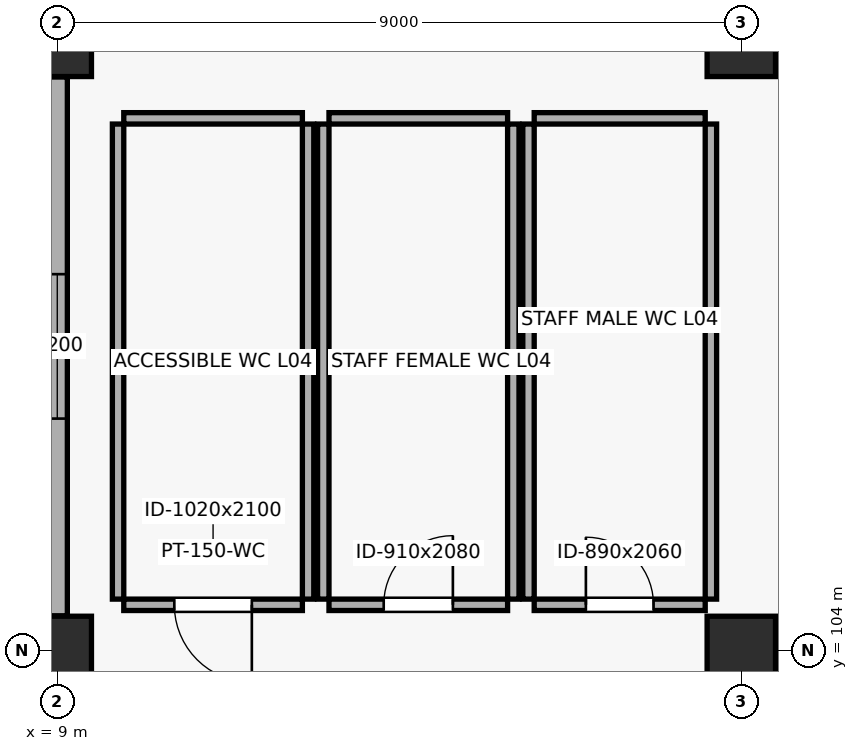
"""IFC4 building model, lengths in metres.
Left out: names, types, materials, properties, quantities, classifications, styles, units other than length and angle.
Written with IfcOpenShell. Run it as: python <this file> out.ifc"""

import sys

from ifc_helpers import new_model, si_unit, direction, frame, frame_2d, origin, origin_2d, place, context, subcontext, project, spatial, rectangle, extrude, element, fill, save


model = new_model("IFC4")
c1 = context("Model", 3, precision=1e-05, world=origin(), true_north=direction((0.0, 1.0)))
c2 = subcontext(c1, "Body", "Model", "MODEL_VIEW")
j1 = project(units=[si_unit("LENGTHUNIT", "METRE"), si_unit("PLANEANGLEUNIT", "RADIAN")], contexts=[c1])
p1 = place(None, origin())
s1 = spatial("IfcSite", under=j1, at=p1, CompositionType="ELEMENT")
p2 = place(p1, origin())
s2 = spatial("IfcBuilding", under=s1, at=p2, CompositionType="ELEMENT")
p3 = place(p2, frame((0.0, 0.0, 18.0)))
s3 = spatial("IfcBuildingStorey", under=s2, at=p3, CompositionType="ELEMENT", Elevation=18.0)
for number, where, z_axis, x_axis in (
    (1, (9.0, 104.0, 0.0), (0.0, 0.0, 1.0), (1.0, 0.0, 0.0)),
    (2, (9.0, 112.0, 0.0), (0.0, 0.0, 1.0), (1.0, 0.0, 0.0)),
    (3, (18.0, 104.0, 0.0), (0.0, 0.0, 1.0), (1.0, 0.0, 0.0)),
    (4, (18.0, 112.0, 0.0), (0.0, 0.0, 1.0), (1.0, 0.0, 0.0)),
):
    element("IfcColumn", number, at=place(p3, frame(where, z_axis=z_axis, x_axis=x_axis)), inside=s3, PredefinedType="COLUMN", context=c2, shape_type="SweptSolid", body=[
        extrude(rectangle(XDim=0.9, YDim=0.9, at=origin_2d()), origin(), (0.0, 0.0, 1.0), 3.9),
    ])
p4 = place(p3, frame((9.0, 104.455, 0.0), z_axis=(0.0, 0.0, 1.0), x_axis=(0.0, 1.0, 0.0)))
e5 = element("IfcWall", 5, at=p4, inside=s3, PredefinedType="STANDARD", context=c2, shape_type="SweptSolid", body=[
    extrude(rectangle(XDim=7.09, YDim=0.265, at=frame_2d((3.545, 0.0))), origin(), (0.0, 0.0, 1.0), 2.98),
])
p5 = place(p4, frame((2.595, 0.0, 0.85)))
e6 = element("IfcOpeningElement", 6, at=p5, cuts=e5, PredefinedType="OPENING", context=c2, shape_type="SweptSolid", body=[
    extrude(rectangle(XDim=1.9, YDim=1.2, at=frame_2d((0.95, 0.6))), frame((0.0, 0.145, 0.0), z_axis=(0.0, -1.0, 0.0), x_axis=(1.0, 0.0, 0.0)), (0.0, 0.0, 1.0), 0.289),
])
p6 = place(p3, frame((9.875, 104.6, 0.0), z_axis=(0.0, 0.0, 1.0), x_axis=(1.0, 0.0, 0.0)))
e7 = element("IfcWall", 7, at=p6, inside=s3, PredefinedType="PARTITIONING", context=c2, shape_type="SweptSolid", body=[
    extrude(rectangle(XDim=2.35, YDim=0.15, at=frame_2d((1.175, 0.0))), origin(), (0.0, 0.0, 1.0), 3.65),
])
p7 = place(p6, frame((0.665, 0.0, 0.0)))
e8 = element("IfcOpeningElement", 8, at=p7, cuts=e7, PredefinedType="OPENING", context=c2, shape_type="SweptSolid", body=[
    extrude(rectangle(XDim=1.02, YDim=2.1, at=frame_2d((0.51, 1.05))), frame((0.0, 0.087, 0.0), z_axis=(0.0, -1.0, 0.0), x_axis=(1.0, 0.0, 0.0)), (0.0, 0.0, 1.0), 0.174),
])
p8 = place(p3, frame((9.875, 111.0, 0.0), z_axis=(0.0, 0.0, 1.0), x_axis=(1.0, 0.0, 0.0)))
e9 = element("IfcWall", 9, at=p8, inside=s3, PredefinedType="PARTITIONING", context=c2, shape_type="SweptSolid", body=[
    extrude(rectangle(XDim=2.35, YDim=0.15, at=frame_2d((1.175, 0.0))), origin(), (0.0, 0.0, 1.0), 3.65),
])
for number, where, z_axis, x_axis in (
    (10, (9.8, 104.675, 0.0), (0.0, 0.0, 1.0), (0.0, 1.0, 0.0)),
    (11, (12.3, 104.675, 0.0), (0.0, 0.0, 1.0), (0.0, 1.0, 0.0)),
):
    element("IfcWall", number, at=place(p3, frame(where, z_axis=z_axis, x_axis=x_axis)), inside=s3, PredefinedType="PARTITIONING", context=c2, shape_type="SweptSolid", body=[
        extrude(rectangle(XDim=6.25, YDim=0.15, at=frame_2d((3.125, 0.0))), origin(), (0.0, 0.0, 1.0), 3.65),
    ])
p9 = place(p3, frame((12.575, 104.6, 0.0), z_axis=(0.0, 0.0, 1.0), x_axis=(1.0, 0.0, 0.0)))
e12 = element("IfcWall", 12, at=p9, inside=s3, PredefinedType="PARTITIONING", context=c2, shape_type="SweptSolid", body=[
    extrude(rectangle(XDim=2.35, YDim=0.15, at=frame_2d((1.175, 0.0))), origin(), (0.0, 0.0, 1.0), 3.65),
])
p10 = place(p9, frame((0.72, 0.0, 0.0)))
e13 = element("IfcOpeningElement", 13, at=p10, cuts=e12, PredefinedType="OPENING", context=c2, shape_type="SweptSolid", body=[
    extrude(rectangle(XDim=0.91, YDim=2.08, at=frame_2d((0.455, 1.04))), frame((0.0, 0.087, 0.0), z_axis=(0.0, -1.0, 0.0), x_axis=(1.0, 0.0, 0.0)), (0.0, 0.0, 1.0), 0.174),
])
p11 = place(p3, frame((12.575, 111.0, 0.0), z_axis=(0.0, 0.0, 1.0), x_axis=(1.0, 0.0, 0.0)))
e14 = element("IfcWall", 14, at=p11, inside=s3, PredefinedType="PARTITIONING", context=c2, shape_type="SweptSolid", body=[
    extrude(rectangle(XDim=2.35, YDim=0.15, at=frame_2d((1.175, 0.0))), origin(), (0.0, 0.0, 1.0), 3.65),
])
for number, where, z_axis, x_axis in (
    (15, (12.5, 104.675, 0.0), (0.0, 0.0, 1.0), (0.0, 1.0, 0.0)),
    (16, (15.0, 104.675, 0.0), (0.0, 0.0, 1.0), (0.0, 1.0, 0.0)),
):
    element("IfcWall", number, at=place(p3, frame(where, z_axis=z_axis, x_axis=x_axis)), inside=s3, PredefinedType="PARTITIONING", context=c2, shape_type="SweptSolid", body=[
        extrude(rectangle(XDim=6.25, YDim=0.15, at=frame_2d((3.125, 0.0))), origin(), (0.0, 0.0, 1.0), 3.65),
    ])
p12 = place(p3, frame((15.275, 104.6, 0.0), z_axis=(0.0, 0.0, 1.0), x_axis=(1.0, 0.0, 0.0)))
e17 = element("IfcWall", 17, at=p12, inside=s3, PredefinedType="PARTITIONING", context=c2, shape_type="SweptSolid", body=[
    extrude(rectangle(XDim=2.25, YDim=0.15, at=frame_2d((1.125, 0.0))), origin(), (0.0, 0.0, 1.0), 3.65),
])
p13 = place(p12, frame((0.68, 0.0, 0.0)))
e18 = element("IfcOpeningElement", 18, at=p13, cuts=e17, PredefinedType="OPENING", context=c2, shape_type="SweptSolid", body=[
    extrude(rectangle(XDim=0.89, YDim=2.06, at=frame_2d((0.445, 1.03))), frame((0.0, 0.087, 0.0), z_axis=(0.0, -1.0, 0.0), x_axis=(1.0, 0.0, 0.0)), (0.0, 0.0, 1.0), 0.174),
])
p14 = place(p3, frame((15.275, 111.0, 0.0), z_axis=(0.0, 0.0, 1.0), x_axis=(1.0, 0.0, 0.0)))
e19 = element("IfcWall", 19, at=p14, inside=s3, PredefinedType="PARTITIONING", context=c2, shape_type="SweptSolid", body=[
    extrude(rectangle(XDim=2.25, YDim=0.15, at=frame_2d((1.125, 0.0))), origin(), (0.0, 0.0, 1.0), 3.65),
])
for number, where, z_axis, x_axis in (
    (20, (15.2, 104.675, 0.0), (0.0, 0.0, 1.0), (0.0, 1.0, 0.0)),
    (21, (17.6, 104.675, 0.0), (0.0, 0.0, 1.0), (0.0, 1.0, 0.0)),
):
    element("IfcWall", number, at=place(p3, frame(where, z_axis=z_axis, x_axis=x_axis)), inside=s3, PredefinedType="PARTITIONING", context=c2, shape_type="SweptSolid", body=[
        extrude(rectangle(XDim=6.25, YDim=0.15, at=frame_2d((3.125, 0.0))), origin(), (0.0, 0.0, 1.0), 3.65),
    ])
p15 = place(p5, origin())
e22 = element("IfcWindow", 22, at=p15, inside=s3, PartitioningType="SINGLE_PANEL", PredefinedType="WINDOW", context=c2, shape_type="SweptSolid", body=[
    extrude(rectangle(XDim=1.9, YDim=1.2, at=frame_2d((0.95, 0.6))), frame((0.0, 0.03, 0.0), z_axis=(0.0, -1.0, 0.0), x_axis=(1.0, 0.0, 0.0)), (0.0, 0.0, 1.0), 0.06),
])
fill(e6, e22)
p16 = place(p7, frame((1.02, 0.0, 0.0), z_axis=(0.0, 0.0, 1.0), x_axis=(-1.0, 0.0, 0.0)))
e23 = element("IfcDoor", 23, at=p16, inside=s3, OperationType="SINGLE_SWING_LEFT", PredefinedType="DOOR", context=c2, shape_type="SweptSolid", body=[
    extrude(rectangle(XDim=1.02, YDim=2.1, at=frame_2d((0.51, 1.05))), frame((0.0, 0.025, 0.0), z_axis=(0.0, -1.0, 0.0), x_axis=(1.0, 0.0, 0.0)), (0.0, 0.0, 1.0), 0.05),
])
fill(e8, e23)
p17 = place(p10, origin())
e24 = element("IfcDoor", 24, at=p17, inside=s3, OperationType="SINGLE_SWING_RIGHT", PredefinedType="DOOR", context=c2, shape_type="SweptSolid", body=[
    extrude(rectangle(XDim=0.91, YDim=2.08, at=frame_2d((0.455, 1.04))), frame((0.0, 0.025, 0.0), z_axis=(0.0, -1.0, 0.0), x_axis=(1.0, 0.0, 0.0)), (0.0, 0.0, 1.0), 0.05),
])
fill(e13, e24)
p18 = place(p13, origin())
e25 = element("IfcDoor", 25, at=p18, inside=s3, OperationType="SINGLE_SWING_LEFT", PredefinedType="DOOR", context=c2, shape_type="SweptSolid", body=[
    extrude(rectangle(XDim=0.89, YDim=2.06, at=frame_2d((0.445, 1.03))), frame((0.0, 0.025, 0.0), z_axis=(0.0, -1.0, 0.0), x_axis=(1.0, 0.0, 0.0)), (0.0, 0.0, 1.0), 0.05),
])
fill(e18, e25)
save(model, sys.argv[1])
